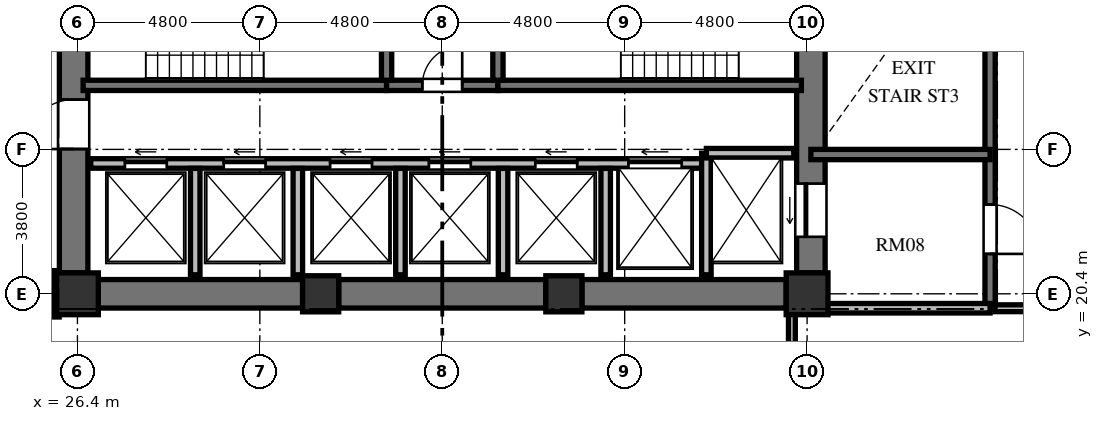
"""IFC4 building model, lengths in metres.
Left out: names, types, materials, properties, quantities, classifications, styles, units other than length and angle.
Written with IfcOpenShell. Run it as: python <this file> out.ifc"""

import sys

from ifc_helpers import new_model, si_unit, direction, frame, frame_2d, origin, origin_2d, place, context, subcontext, project, spatial, rectangle, extrude, element, fill, save


model = new_model("IFC4")
c1 = context("Model", 3, precision=1e-05, world=origin(), true_north=direction((0.0, 1.0)))
c2 = subcontext(c1, "Body", "Model", "MODEL_VIEW")
j1 = project(units=[si_unit("LENGTHUNIT", "METRE"), si_unit("PLANEANGLEUNIT", "RADIAN")], contexts=[c1])
p1 = place(None, origin())
s1 = spatial("IfcSite", under=j1, at=p1, CompositionType="ELEMENT")
p2 = place(p1, origin())
s2 = spatial("IfcBuilding", under=s1, at=p2, CompositionType="ELEMENT")
p3 = place(p2, frame((0.0, 0.0, 81.744)))
s3 = spatial("IfcBuildingStorey", under=s2, at=p3, CompositionType="ELEMENT", Elevation=81.744)
p4 = place(p3, frame((26.4, 20.4, 0.0), z_axis=(0.0, 0.0, 1.0), x_axis=(1.0, 0.0, 0.0)))
e1 = element("IfcColumn", 1, at=p4, inside=s3, PredefinedType="COLUMN", context=c2, shape_type="SweptSolid", body=[
    extrude(rectangle(XDim=1.1, YDim=1.1, at=origin_2d()), origin(), (0.0, 0.0, 1.0), 3.648),
])
for number, where, z_axis, x_axis in (
    (2, (32.8, 20.4, 0.0), (0.0, 0.0, 1.0), (1.0, 0.0, 0.0)),
    (3, (39.2, 20.4, 0.0), (0.0, 0.0, 1.0), (1.0, 0.0, 0.0)),
):
    element("IfcColumn", number, at=place(p3, frame(where, z_axis=z_axis, x_axis=x_axis)), inside=s3, PredefinedType="COLUMN", context=c2, shape_type="SweptSolid", body=[
        extrude(rectangle(XDim=0.95, YDim=0.95, at=origin_2d()), origin(), (0.0, 0.0, 1.0), 3.648),
    ])
p5 = place(p3, frame((45.6, 20.4, 0.0), z_axis=(0.0, 0.0, 1.0), x_axis=(1.0, 0.0, 0.0)))
e4 = element("IfcColumn", 4, at=p5, inside=s3, PredefinedType="COLUMN", context=c2, shape_type="SweptSolid", body=[
    extrude(rectangle(XDim=1.1, YDim=1.1, at=origin_2d()), origin(), (0.0, 0.0, 1.0), 3.648),
])
p6 = place(p3, frame((26.3, 20.95, 0.0), z_axis=(0.0, 0.0, 1.0), x_axis=(0.0, 1.0, 0.0)))
e5 = element("IfcWall", 5, at=p6, inside=s3, PredefinedType="SHEAR", context=c2, shape_type="SweptSolid", body=[
    extrude(rectangle(XDim=14.1, YDim=0.75, at=frame_2d((7.05, 0.0))), origin(), (0.0, 0.0, 1.0), 3.648),
])
p7 = place(p6, frame((6.5, 0.0, 0.0)))
e6 = element("IfcOpeningElement", 6, at=p7, cuts=e5, PredefinedType="OPENING", context=c2, shape_type="SweptSolid", body=[
    extrude(rectangle(XDim=1.2, YDim=2.15, at=frame_2d((0.6, 1.075))), frame((0.0, 0.385, 0.0), z_axis=(0.0, -1.0, 0.0), x_axis=(1.0, 0.0, 0.0)), (0.0, 0.0, 1.0), 0.77),
])
p8 = place(p6, frame((9.6, 0.0, 0.0)))
e7 = element("IfcOpeningElement", 7, at=p8, cuts=e5, PredefinedType="OPENING", context=c2, shape_type="SweptSolid", body=[
    extrude(rectangle(XDim=1.3, YDim=2.2, at=frame_2d((0.65, 1.1))), frame((0.0, 0.385, 0.0), z_axis=(0.0, -1.0, 0.0), x_axis=(1.0, 0.0, 0.0)), (0.0, 0.0, 1.0), 0.77),
])
p9 = place(p6, frame((3.26, 0.0, 0.0)))
e8 = element("IfcOpeningElement", 8, at=p9, cuts=e5, PredefinedType="OPENING", context=c2, shape_type="SweptSolid", body=[
    extrude(rectangle(XDim=1.3, YDim=2.2, at=frame_2d((0.65, 1.1))), frame((0.0, 0.385, 0.0), z_axis=(0.0, -1.0, 0.0), x_axis=(1.0, 0.0, 0.0)), (0.0, 0.0, 1.0), 0.77),
])
p10 = place(p3, frame((45.7, 20.95, 0.0), z_axis=(0.0, 0.0, 1.0), x_axis=(0.0, 1.0, 0.0)))
e9 = element("IfcWall", 9, at=p10, inside=s3, PredefinedType="SHEAR", context=c2, shape_type="SweptSolid", body=[
    extrude(rectangle(XDim=14.1, YDim=0.75, at=frame_2d((7.05, 0.0))), origin(), (0.0, 0.0, 1.0), 3.648),
])
p11 = place(p10, frame((11.75, 0.0, 0.0)))
e10 = element("IfcOpeningElement", 10, at=p11, cuts=e9, PredefinedType="OPENING", context=c2, shape_type="SweptSolid", body=[
    extrude(rectangle(XDim=1.4, YDim=2.3, at=frame_2d((0.7, 1.15))), frame((0.0, 0.385, 0.0), z_axis=(0.0, -1.0, 0.0), x_axis=(1.0, 0.0, 0.0)), (0.0, 0.0, 1.0), 0.77),
])
p12 = place(p10, frame((0.95, 0.0, 0.0)))
e11 = element("IfcOpeningElement", 11, at=p12, cuts=e9, PredefinedType="OPENING", context=c2, shape_type="SweptSolid", body=[
    extrude(rectangle(XDim=1.4, YDim=2.3, at=frame_2d((0.7, 1.15))), frame((0.0, 0.385, 0.0), z_axis=(0.0, -1.0, 0.0), x_axis=(1.0, 0.0, 0.0)), (0.0, 0.0, 1.0), 0.77),
])
p13 = place(p3, frame((26.95, 20.4, 0.0), z_axis=(0.0, 0.0, 1.0), x_axis=(1.0, 0.0, 0.0)))
e12 = element("IfcWall", 12, at=p13, inside=s3, PredefinedType="SHEAR", context=c2, shape_type="SweptSolid", body=[
    extrude(rectangle(XDim=5.375, YDim=0.75, at=frame_2d((2.688, 0.0))), origin(), (0.0, 0.0, 1.0), 3.648),
])
p14 = place(p3, frame((33.275, 20.4, 0.0), z_axis=(0.0, 0.0, 1.0), x_axis=(1.0, 0.0, 0.0)))
e13 = element("IfcWall", 13, at=p14, inside=s3, PredefinedType="SHEAR", context=c2, shape_type="SweptSolid", body=[
    extrude(rectangle(XDim=5.45, YDim=0.75, at=frame_2d((2.725, 0.0))), origin(), (0.0, 0.0, 1.0), 3.648),
])
p15 = place(p3, frame((39.675, 20.4, 0.0), z_axis=(0.0, 0.0, 1.0), x_axis=(1.0, 0.0, 0.0)))
e14 = element("IfcWall", 14, at=p15, inside=s3, PredefinedType="SHEAR", context=c2, shape_type="SweptSolid", body=[
    extrude(rectangle(XDim=5.375, YDim=0.75, at=frame_2d((2.688, 0.0))), origin(), (0.0, 0.0, 1.0), 3.648),
])
p16 = place(p3, frame((26.55, 25.885, 0.0), z_axis=(0.0, 0.0, 1.0), x_axis=(1.0, 0.0, 0.0)))
e15 = element("IfcWall", 15, at=p16, inside=s3, PredefinedType="SHEAR", context=c2, shape_type="SweptSolid", body=[
    extrude(rectangle(XDim=7.985, YDim=0.27, at=frame_2d((3.992, 0.0))), origin(), (0.0, 0.0, 1.0), 3.648),
])
p17 = place(p3, frame((34.535, 25.885, 0.0), z_axis=(0.0, 0.0, 1.0), x_axis=(1.0, 0.0, 0.0)))
e16 = element("IfcWall", 16, at=p17, inside=s3, PredefinedType="SHEAR", context=c2, shape_type="SweptSolid", body=[
    extrude(rectangle(XDim=2.93, YDim=0.27, at=frame_2d((1.465, 0.0))), origin(), (0.0, 0.0, 1.0), 3.648),
])
p18 = place(p17, frame((0.94, 0.0, 0.0)))
e17 = element("IfcOpeningElement", 17, at=p18, cuts=e16, PredefinedType="OPENING", context=c2, shape_type="SweptSolid", body=[
    extrude(rectangle(XDim=1.05, YDim=2.15, at=frame_2d((0.525, 1.075))), frame((0.0, 0.145, 0.0), z_axis=(0.0, -1.0, 0.0), x_axis=(1.0, 0.0, 0.0)), (0.0, 0.0, 1.0), 0.29),
])
p19 = place(p3, frame((37.465, 25.885, 0.0), z_axis=(0.0, 0.0, 1.0), x_axis=(1.0, 0.0, 0.0)))
e18 = element("IfcWall", 18, at=p19, inside=s3, PredefinedType="SHEAR", context=c2, shape_type="SweptSolid", body=[
    extrude(rectangle(XDim=7.985, YDim=0.27, at=frame_2d((3.992, 0.0))), origin(), (0.0, 0.0, 1.0), 3.648),
])
for number, where, z_axis, x_axis in (
    (19, (34.535, 26.02, 0.0), (0.0, 0.0, 1.0), (0.0, 1.0, 0.0)),
    (20, (37.465, 26.02, 0.0), (0.0, 0.0, 1.0), (0.0, 1.0, 0.0)),
):
    element("IfcWall", number, at=place(p3, frame(where, z_axis=z_axis, x_axis=x_axis)), inside=s3, PredefinedType="SHEAR", context=c2, shape_type="SweptSolid", body=[
        extrude(rectangle(XDim=4.08, YDim=0.27, at=frame_2d((2.04, 0.0))), origin(), (0.0, 0.0, 1.0), 3.648),
    ])
p20 = place(p3, frame((26.75, 23.83, 0.0), z_axis=(0.0, 0.0, 1.0), x_axis=(1.0, 0.0, 0.0)))
e21 = element("IfcWall", 21, at=p20, inside=s3, PredefinedType="SOLIDWALL", context=c2, shape_type="SweptSolid", body=[
    extrude(rectangle(XDim=16.2, YDim=0.25, at=frame_2d((8.1, 0.0))), origin(), (0.0, 0.0, 1.0), 3.428),
])
p21 = place(p20, frame((0.9, 0.0, 0.0)))
e22 = element("IfcOpeningElement", 22, at=p21, cuts=e21, PredefinedType="OPENING", context=c2, shape_type="SweptSolid", body=[
    extrude(rectangle(XDim=1.1, YDim=2.2, at=frame_2d((0.55, 1.1))), frame((0.0, 0.135, 0.0), z_axis=(0.0, -1.0, 0.0), x_axis=(1.0, 0.0, 0.0)), (0.0, 0.0, 1.0), 0.27),
])
p22 = place(p20, frame((3.5, 0.0, 0.0)))
e23 = element("IfcOpeningElement", 23, at=p22, cuts=e21, PredefinedType="OPENING", context=c2, shape_type="SweptSolid", body=[
    extrude(rectangle(XDim=1.1, YDim=2.2, at=frame_2d((0.55, 1.1))), frame((0.0, 0.135, 0.0), z_axis=(0.0, -1.0, 0.0), x_axis=(1.0, 0.0, 0.0)), (0.0, 0.0, 1.0), 0.27),
])
p23 = place(p20, frame((6.3, 0.0, 0.0)))
e24 = element("IfcOpeningElement", 24, at=p23, cuts=e21, PredefinedType="OPENING", context=c2, shape_type="SweptSolid", body=[
    extrude(rectangle(XDim=1.1, YDim=2.2, at=frame_2d((0.55, 1.1))), frame((0.0, 0.135, 0.0), z_axis=(0.0, -1.0, 0.0), x_axis=(1.0, 0.0, 0.0)), (0.0, 0.0, 1.0), 0.27),
])
p24 = place(p20, frame((8.9, 0.0, 0.0)))
e25 = element("IfcOpeningElement", 25, at=p24, cuts=e21, PredefinedType="OPENING", context=c2, shape_type="SweptSolid", body=[
    extrude(rectangle(XDim=1.1, YDim=2.2, at=frame_2d((0.55, 1.1))), frame((0.0, 0.135, 0.0), z_axis=(0.0, -1.0, 0.0), x_axis=(1.0, 0.0, 0.0)), (0.0, 0.0, 1.0), 0.27),
])
p25 = place(p20, frame((11.7, 0.0, 0.0)))
e26 = element("IfcOpeningElement", 26, at=p25, cuts=e21, PredefinedType="OPENING", context=c2, shape_type="SweptSolid", body=[
    extrude(rectangle(XDim=1.1, YDim=2.2, at=frame_2d((0.55, 1.1))), frame((0.0, 0.135, 0.0), z_axis=(0.0, -1.0, 0.0), x_axis=(1.0, 0.0, 0.0)), (0.0, 0.0, 1.0), 0.27),
])
p26 = place(p20, frame((14.15, 0.0, 0.0)))
e27 = element("IfcOpeningElement", 27, at=p26, cuts=e21, PredefinedType="OPENING", context=c2, shape_type="SweptSolid", body=[
    extrude(rectangle(XDim=1.4, YDim=2.3, at=frame_2d((0.7, 1.15))), frame((0.0, 0.135, 0.0), z_axis=(0.0, -1.0, 0.0), x_axis=(1.0, 0.0, 0.0)), (0.0, 0.0, 1.0), 0.27),
])
p27 = place(p3, frame((42.95, 20.9, 0.0), z_axis=(0.0, 0.0, 1.0), x_axis=(0.0, 1.0, 0.0)))
e28 = element("IfcWall", 28, at=p27, inside=s3, PredefinedType="SOLIDWALL", context=c2, shape_type="SweptSolid", body=[
    extrude(rectangle(XDim=3.2, YDim=0.25, at=frame_2d((1.6, 0.0))), origin(), (0.0, 0.0, 1.0), 3.428),
])
p28 = place(p3, frame((42.95, 24.1, 0.0), z_axis=(0.0, 0.0, 1.0), x_axis=(1.0, 0.0, 0.0)))
e29 = element("IfcWall", 29, at=p28, inside=s3, PredefinedType="SOLIDWALL", context=c2, shape_type="SweptSolid", body=[
    extrude(rectangle(XDim=2.3, YDim=0.25, at=frame_2d((1.15, 0.0))), origin(), (0.0, 0.0, 1.0), 3.428),
])
for number, where, z_axis, x_axis in (
    (30, (29.5, 20.9, 0.0), (0.0, 0.0, 1.0), (0.0, 1.0, 0.0)),
    (31, (32.2, 20.9, 0.0), (0.0, 0.0, 1.0), (0.0, 1.0, 0.0)),
    (32, (34.9, 20.9, 0.0), (0.0, 0.0, 1.0), (0.0, 1.0, 0.0)),
    (33, (37.6, 20.9, 0.0), (0.0, 0.0, 1.0), (0.0, 1.0, 0.0)),
    (34, (40.3, 20.9, 0.0), (0.0, 0.0, 1.0), (0.0, 1.0, 0.0)),
):
    element("IfcWall", number, at=place(p3, frame(where, z_axis=z_axis, x_axis=x_axis)), inside=s3, PredefinedType="SOLIDWALL", context=c2, shape_type="SweptSolid", body=[
        extrude(rectangle(XDim=2.8, YDim=0.25, at=frame_2d((1.4, 0.0))), origin(), (0.0, 0.0, 1.0), 3.428),
    ])
p29 = place(p3, frame((50.415, 35.845, 0.0), z_axis=(0.0, 0.0, 1.0), x_axis=(0.0, -1.0, 0.0)))
e35 = element("IfcWall", 35, at=p29, inside=s3, PredefinedType="SHEAR", context=c2, shape_type="SweptSolid", body=[
    extrude(rectangle(XDim=15.825, YDim=0.27, at=frame_2d((7.913, 0.0))), origin(), (0.0, 0.0, 1.0), 3.648),
])
p30 = place(p29, frame((4.445, 0.0, 0.0)))
e36 = element("IfcOpeningElement", 36, at=p30, cuts=e35, PredefinedType="OPENING", context=c2, shape_type="SweptSolid", body=[
    extrude(rectangle(XDim=1.2, YDim=2.15, at=frame_2d((0.6, 1.075))), frame((0.0, 0.145, 0.0), z_axis=(0.0, -1.0, 0.0), x_axis=(1.0, 0.0, 0.0)), (0.0, 0.0, 1.0), 0.29),
])
p31 = place(p29, frame((1.295, 0.0, 0.0)))
e37 = element("IfcOpeningElement", 37, at=p31, cuts=e35, PredefinedType="OPENING", context=c2, shape_type="SweptSolid", body=[
    extrude(rectangle(XDim=1.3, YDim=2.2, at=frame_2d((0.65, 1.1))), frame((0.0, 0.145, 0.0), z_axis=(0.0, -1.0, 0.0), x_axis=(1.0, 0.0, 0.0)), (0.0, 0.0, 1.0), 0.29),
])
p32 = place(p29, frame((13.095, 0.0, 0.0)))
e38 = element("IfcOpeningElement", 38, at=p32, cuts=e35, PredefinedType="OPENING", context=c2, shape_type="SweptSolid", body=[
    extrude(rectangle(XDim=1.3, YDim=2.2, at=frame_2d((0.65, 1.1))), frame((0.0, 0.145, 0.0), z_axis=(0.0, -1.0, 0.0), x_axis=(1.0, 0.0, 0.0)), (0.0, 0.0, 1.0), 0.29),
])
p33 = place(p3, frame((45.7, 24.065, 0.0), z_axis=(0.0, 0.0, 1.0), x_axis=(1.0, 0.0, 0.0)))
e39 = element("IfcWall", 39, at=p33, inside=s3, PredefinedType="SHEAR", context=c2, shape_type="SweptSolid", body=[
    extrude(rectangle(XDim=4.715, YDim=0.27, at=frame_2d((2.357, 0.0))), origin(), (0.0, 0.0, 1.0), 3.648),
])
p34 = place(p3, frame((45.7, 20.02, 0.0), z_axis=(0.0, 0.0, 1.0), x_axis=(1.0, 0.0, 0.0)))
e40 = element("IfcWall", 40, at=p34, inside=s3, PredefinedType="SOLIDWALL", context=c2, shape_type="SweptSolid", body=[
    extrude(rectangle(XDim=4.715, YDim=0.25, at=frame_2d((2.357, 0.0))), origin(), (0.0, 0.0, 1.0), 3.428),
])
p35 = place(p3, frame((53.19, 20.02, 0.0), z_axis=(0.0, 0.0, 1.0), x_axis=(-1.0, 0.0, 0.0)))
e41 = element("IfcWall", 41, at=p35, inside=s3, PredefinedType="PARTITIONING", context=c2, shape_type="SweptSolid", body=[
    extrude(rectangle(XDim=2.65, YDim=0.18, at=frame_2d((1.325, 0.0))), origin(), (0.0, 0.0, 1.0), 3.428),
])
p36 = place(p3, frame((25.83, 21.01, 0.0), z_axis=(0.0, 0.0, 1.0), x_axis=(0.0, -1.0, 0.0)))
e42 = element("IfcWall", 42, at=p36, inside=s3, PredefinedType="PARTITIONING", context=c2, shape_type="SweptSolid", body=[
    extrude(rectangle(XDim=1.22, YDim=0.18, at=frame_2d((0.61, 0.0))), origin(), (0.0, 0.0, 1.0), 3.428),
])
p37 = place(p3, frame((45.2, 19.91, 0.0), z_axis=(0.0, 0.0, 1.0), x_axis=(0.0, -1.0, 0.0)))
e43 = element("IfcWall", 43, at=p37, inside=s3, PredefinedType="PARTITIONING", context=c2, shape_type="SweptSolid", body=[
    extrude(rectangle(XDim=2.55, YDim=0.18, at=frame_2d((1.275, 0.0))), origin(), (0.0, 0.0, 1.0), 3.428),
])
p38 = place(p18, origin())
e44 = element("IfcDoor", 44, at=p38, inside=s3, OperationType="SINGLE_SWING_RIGHT", PredefinedType="DOOR", context=c2, shape_type="SweptSolid", body=[
    extrude(rectangle(XDim=1.05, YDim=2.15, at=frame_2d((0.525, 1.075))), frame((0.0, 0.025, 0.0), z_axis=(0.0, -1.0, 0.0), x_axis=(1.0, 0.0, 0.0)), (0.0, 0.0, 1.0), 0.05),
])
fill(e17, e44)
p39 = place(p9, origin())
e45 = element("IfcDoor", 45, at=p39, inside=s3, OperationType="SINGLE_SWING_LEFT", PredefinedType="DOOR", context=c2, shape_type="SweptSolid", body=[
    extrude(rectangle(XDim=1.3, YDim=2.2, at=frame_2d((0.65, 1.1))), frame((0.0, 0.025, 0.0), z_axis=(0.0, -1.0, 0.0), x_axis=(1.0, 0.0, 0.0)), (0.0, 0.0, 1.0), 0.05),
])
fill(e8, e45)
p40 = place(p21, origin())
e46 = element("IfcDoor", 46, at=p40, inside=s3, OperationType="SLIDING_TO_LEFT", PredefinedType="DOOR", context=c2, shape_type="SweptSolid", body=[
    extrude(rectangle(XDim=1.1, YDim=2.2, at=frame_2d((0.55, 1.1))), frame((0.0, 0.025, 0.0), z_axis=(0.0, -1.0, 0.0), x_axis=(1.0, 0.0, 0.0)), (0.0, 0.0, 1.0), 0.05),
])
fill(e22, e46)
p41 = place(p22, origin())
e47 = element("IfcDoor", 47, at=p41, inside=s3, OperationType="SLIDING_TO_LEFT", PredefinedType="DOOR", context=c2, shape_type="SweptSolid", body=[
    extrude(rectangle(XDim=1.1, YDim=2.2, at=frame_2d((0.55, 1.1))), frame((0.0, 0.025, 0.0), z_axis=(0.0, -1.0, 0.0), x_axis=(1.0, 0.0, 0.0)), (0.0, 0.0, 1.0), 0.05),
])
fill(e23, e47)
p42 = place(p23, origin())
e48 = element("IfcDoor", 48, at=p42, inside=s3, OperationType="SLIDING_TO_LEFT", PredefinedType="DOOR", context=c2, shape_type="SweptSolid", body=[
    extrude(rectangle(XDim=1.1, YDim=2.2, at=frame_2d((0.55, 1.1))), frame((0.0, 0.025, 0.0), z_axis=(0.0, -1.0, 0.0), x_axis=(1.0, 0.0, 0.0)), (0.0, 0.0, 1.0), 0.05),
])
fill(e24, e48)
p43 = place(p24, origin())
e49 = element("IfcDoor", 49, at=p43, inside=s3, OperationType="SLIDING_TO_LEFT", PredefinedType="DOOR", context=c2, shape_type="SweptSolid", body=[
    extrude(rectangle(XDim=1.1, YDim=2.2, at=frame_2d((0.55, 1.1))), frame((0.0, 0.025, 0.0), z_axis=(0.0, -1.0, 0.0), x_axis=(1.0, 0.0, 0.0)), (0.0, 0.0, 1.0), 0.05),
])
fill(e25, e49)
p44 = place(p25, origin())
e50 = element("IfcDoor", 50, at=p44, inside=s3, OperationType="SLIDING_TO_LEFT", PredefinedType="DOOR", context=c2, shape_type="SweptSolid", body=[
    extrude(rectangle(XDim=1.1, YDim=2.2, at=frame_2d((0.55, 1.1))), frame((0.0, 0.025, 0.0), z_axis=(0.0, -1.0, 0.0), x_axis=(1.0, 0.0, 0.0)), (0.0, 0.0, 1.0), 0.05),
])
fill(e26, e50)
p45 = place(p12, origin())
e51 = element("IfcDoor", 51, at=p45, inside=s3, OperationType="SLIDING_TO_LEFT", PredefinedType="DOOR", context=c2, shape_type="SweptSolid", body=[
    extrude(rectangle(XDim=1.4, YDim=2.3, at=frame_2d((0.7, 1.15))), frame((0.0, 0.025, 0.0), z_axis=(0.0, -1.0, 0.0), x_axis=(1.0, 0.0, 0.0)), (0.0, 0.0, 1.0), 0.05),
])
fill(e11, e51)
p46 = place(p26, origin())
e52 = element("IfcDoor", 52, at=p46, inside=s3, OperationType="SLIDING_TO_LEFT", PredefinedType="DOOR", context=c2, shape_type="SweptSolid", body=[
    extrude(rectangle(XDim=1.4, YDim=2.3, at=frame_2d((0.7, 1.15))), frame((0.0, 0.025, 0.0), z_axis=(0.0, -1.0, 0.0), x_axis=(1.0, 0.0, 0.0)), (0.0, 0.0, 1.0), 0.05),
])
fill(e27, e52)
p47 = place(p32, origin())
e53 = element("IfcDoor", 53, at=p47, inside=s3, OperationType="SINGLE_SWING_RIGHT", PredefinedType="DOOR", context=c2, shape_type="SweptSolid", body=[
    extrude(rectangle(XDim=1.3, YDim=2.2, at=frame_2d((0.65, 1.1))), frame((0.0, 0.025, 0.0), z_axis=(0.0, -1.0, 0.0), x_axis=(1.0, 0.0, 0.0)), (0.0, 0.0, 1.0), 0.05),
])
fill(e38, e53)
save(model, sys.argv[1])
